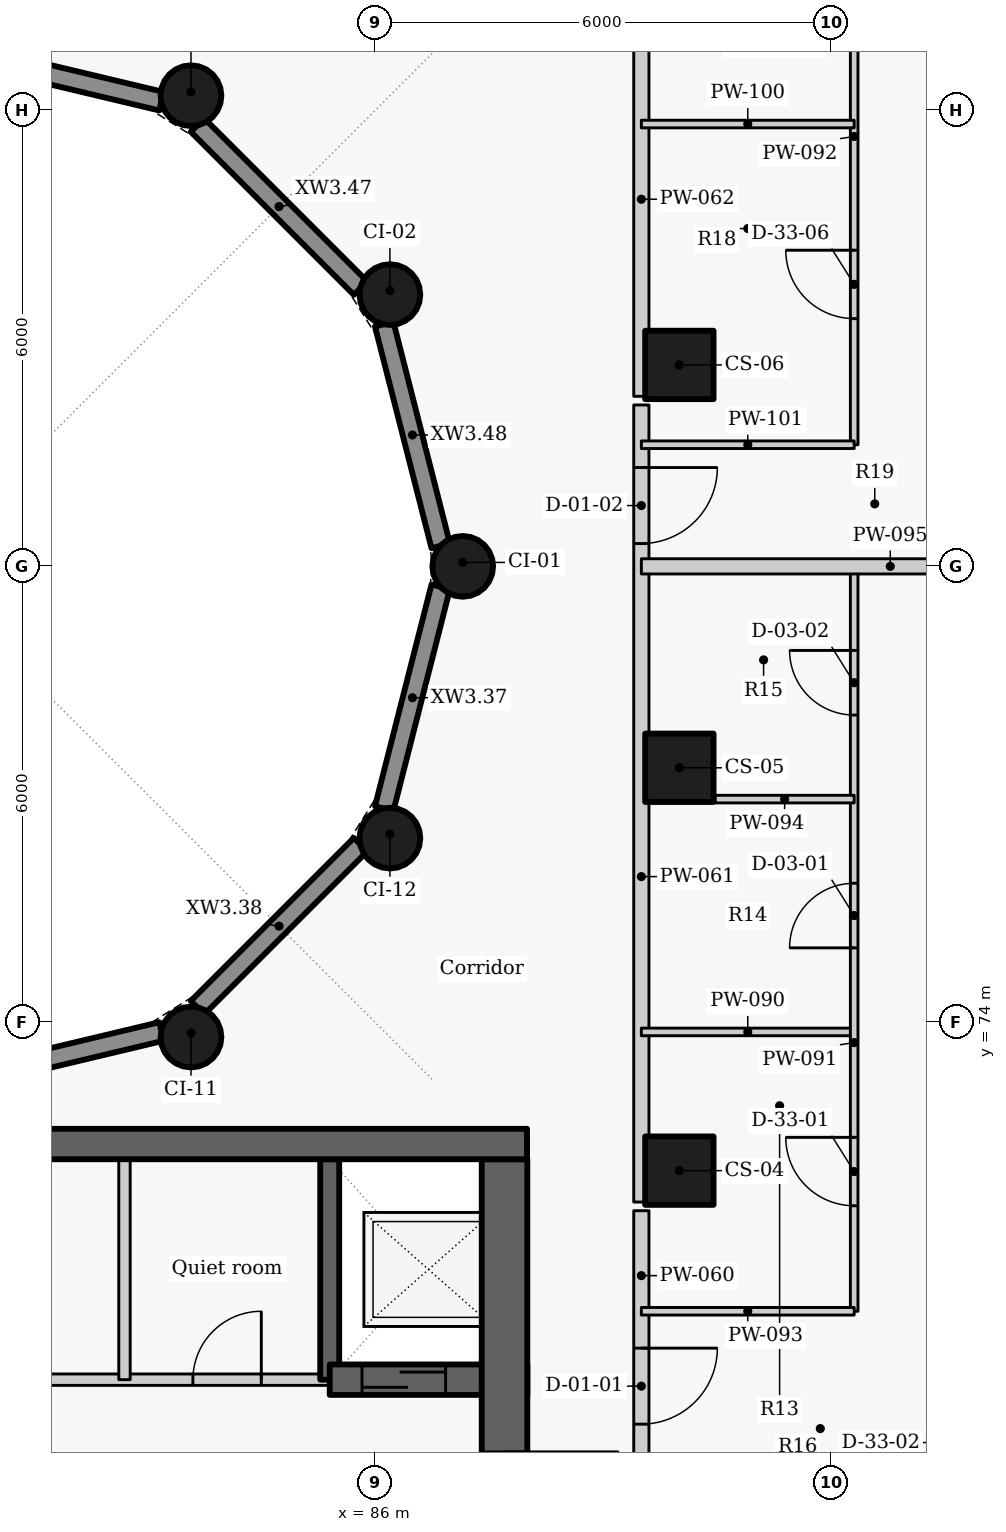
"""IFC4 building model, lengths in metres.
Left out: names, types, materials, properties, quantities, classifications, styles, units other than length and angle.
Written with IfcOpenShell. Run it as: python <this file> out.ifc"""

import sys

from ifc_helpers import new_model, si_unit, direction, frame, frame_2d, origin, origin_2d, place, context, subcontext, project, spatial, rectangle, circle, extrude, element, fill, save


model = new_model("IFC4")
c1 = context("Model", 3, precision=1e-05, world=origin(), true_north=direction((0.0, 1.0)))
c2 = subcontext(c1, "Body", "Model", "MODEL_VIEW")
j1 = project(units=[si_unit("LENGTHUNIT", "METRE"), si_unit("PLANEANGLEUNIT", "RADIAN")], contexts=[c1])
p1 = place(None, origin())
s1 = spatial("IfcSite", under=j1, at=p1, CompositionType="ELEMENT")
p2 = place(p1, origin())
s2 = spatial("IfcBuilding", under=s1, at=p2, CompositionType="ELEMENT")
p3 = place(p2, frame((0.0, 0.0, 229.5)))
s3 = spatial("IfcBuildingStorey", under=s2, at=p3, CompositionType="ELEMENT", Elevation=229.5)
for number, where, z_axis, x_axis in (
    (1, (90.0, 72.05, 0.0), (0.0, 0.0, 1.0), (0.0, 1.0, 0.0)),
    (2, (90.0, 77.35, 0.0), (0.0, 0.0, 1.0), (0.0, 1.0, 0.0)),
    (3, (90.0, 82.65, 0.0), (0.0, 0.0, 1.0), (0.0, 1.0, 0.0)),
):
    element("IfcColumn", number, at=place(p3, frame(where, z_axis=z_axis, x_axis=x_axis)), inside=s3, PredefinedType="COLUMN", context=c2, shape_type="SweptSolid", body=[
        extrude(rectangle(XDim=0.9, YDim=0.9, at=origin_2d()), origin(), (0.0, 0.0, 1.0), 3.3),
    ])
for number, where, z_axis, x_axis in (
    (4, (87.15, 80.0, 0.0), (0.0, 0.0, 1.0), (0.0, 1.0, 0.0)),
    (5, (86.192, 83.575, 0.0), (0.0, 0.0, 1.0), (-0.5, 0.866, 0.0)),
    (6, (83.575, 86.192, 0.0), (0.0, 0.0, 1.0), (-0.866, 0.5, 0.0)),
    (7, (83.575, 73.808, 0.0), (0.0, 0.0, 1.0), (0.866, 0.5, 0.0)),
    (8, (86.192, 76.425, 0.0), (0.0, 0.0, 1.0), (0.5, 0.866, 0.0)),
):
    element("IfcColumn", number, at=place(p3, frame(where, z_axis=z_axis, x_axis=x_axis)), inside=s3, PredefinedType="COLUMN", context=c2, shape_type="SweptSolid", body=[
        extrude(circle(Radius=0.4, at=origin_2d()), origin(), (0.0, 0.0, 1.0), 3.3),
    ])
p4 = place(p3, frame((86.86, 79.73, 0.0), z_axis=(0.0, 0.0, 1.0), x_axis=(-0.247055971283, -0.969001211069, 0.0)))
e9 = element("IfcWall", 9, at=p4, inside=s3, PredefinedType="SOLIDWALL", context=c2, shape_type="SweptSolid", body=[
    extrude(rectangle(XDim=3.01, YDim=0.25, at=frame_2d((1.505, 0.0))), origin(), (0.0, 0.0, 1.0), 2.425),
])
p5 = place(p3, frame((85.806, 76.339, 0.0), z_axis=(0.0, 0.0, 1.0), x_axis=(-0.707106781187, -0.707106781187, 0.0)))
e10 = element("IfcWall", 10, at=p5, inside=s3, PredefinedType="SOLIDWALL", context=c2, shape_type="SweptSolid", body=[
    extrude(rectangle(XDim=3.033, YDim=0.25, at=frame_2d((1.517, 0.0))), origin(), (0.0, 0.0, 1.0), 2.425),
])
for number, where, z_axis, x_axis in (
    (11, (83.186, 73.881, 0.0), (0.0, 0.0, 1.0), (-0.973, -0.232, 0.0)),
    (12, (80.029, 86.872, 0.0), (0.0, 0.0, 1.0), (0.973, -0.232, 0.0)),
):
    element("IfcWall", number, at=place(p3, frame(where, z_axis=z_axis, x_axis=x_axis)), inside=s3, PredefinedType="SOLIDWALL", context=c2, shape_type="SweptSolid", body=[
        extrude(rectangle(XDim=3.246, YDim=0.25, at=frame_2d((1.623, 0.0))), origin(), (0.0, 0.0, 1.0), 2.425),
    ])
p6 = place(p3, frame((83.661, 85.806, 0.0), z_axis=(0.0, 0.0, 1.0), x_axis=(0.707106781187, -0.707106781187, 0.0)))
e13 = element("IfcWall", 13, at=p6, inside=s3, PredefinedType="SOLIDWALL", context=c2, shape_type="SweptSolid", body=[
    extrude(rectangle(XDim=3.033, YDim=0.25, at=frame_2d((1.517, 0.0))), origin(), (0.0, 0.0, 1.0), 2.425),
])
p7 = place(p3, frame((86.117, 83.187, 0.0), z_axis=(0.0, 0.0, 1.0), x_axis=(0.247055971283, -0.969001211069, 0.0)))
e14 = element("IfcWall", 14, at=p7, inside=s3, PredefinedType="SOLIDWALL", context=c2, shape_type="SweptSolid", body=[
    extrude(rectangle(XDim=3.01, YDim=0.25, at=frame_2d((1.505, 0.0))), origin(), (0.0, 0.0, 1.0), 2.425),
])
p8 = place(p3, frame((72.0, 69.3, 0.0), z_axis=(0.0, 0.0, 1.0), x_axis=(1.0, 0.0, 0.0)))
e15 = element("IfcWall", 15, at=p8, inside=s3, PredefinedType="PARTITIONING", context=c2, shape_type="SweptSolid", body=[
    extrude(rectangle(XDim=13.4, YDim=0.15, at=frame_2d((6.7, 0.0))), origin(), (0.0, 0.0, 1.0), 3.025),
])
p9 = place(p8, frame((1.175, 0.0, 0.0)))
e16 = element("IfcOpeningElement", 16, at=p9, cuts=e15, PredefinedType="OPENING", context=c2, shape_type="SweptSolid", body=[
    extrude(rectangle(XDim=0.9, YDim=2.1, at=frame_2d((0.45, 1.05))), frame((0.0, 0.085, 0.0), z_axis=(0.0, -1.0, 0.0), x_axis=(1.0, 0.0, 0.0)), (0.0, 0.0, 1.0), 0.17),
])
p10 = place(p8, frame((6.2, 0.0, 0.0)))
e17 = element("IfcOpeningElement", 17, at=p10, cuts=e15, PredefinedType="OPENING", context=c2, shape_type="SweptSolid", body=[
    extrude(rectangle(XDim=0.9, YDim=2.1, at=frame_2d((0.45, 1.05))), frame((0.0, 0.085, 0.0), z_axis=(0.0, -1.0, 0.0), x_axis=(1.0, 0.0, 0.0)), (0.0, 0.0, 1.0), 0.17),
])
p11 = place(p8, frame((11.6, 0.0, 0.0)))
e18 = element("IfcOpeningElement", 18, at=p11, cuts=e15, PredefinedType="OPENING", context=c2, shape_type="SweptSolid", body=[
    extrude(rectangle(XDim=0.9, YDim=2.1, at=frame_2d((0.45, 1.05))), frame((0.0, 0.085, 0.0), z_axis=(0.0, -1.0, 0.0), x_axis=(1.0, 0.0, 0.0)), (0.0, 0.0, 1.0), 0.17),
])
p12 = place(p3, frame((85.4, 69.3, -0.275), z_axis=(0.0, 0.0, 1.0), x_axis=(0.0, 1.0, 0.0)))
e19 = element("IfcWall", 19, at=p12, inside=s3, PredefinedType="SHEAR", context=c2, shape_type="SweptSolid", body=[
    extrude(rectangle(XDim=2.9, YDim=0.25, at=frame_2d((1.45, 0.0))), origin(), (0.0, 0.0, 1.0), 3.3),
])
p13 = place(p3, frame((85.4, 69.3, -0.275), z_axis=(0.0, 0.0, 1.0), x_axis=(1.0, 0.0, 0.0)))
e20 = element("IfcWall", 20, at=p13, inside=s3, PredefinedType="SHEAR", context=c2, shape_type="SweptSolid", body=[
    extrude(rectangle(XDim=2.6, YDim=0.4, at=frame_2d((1.3, 0.0))), origin(), (0.0, 0.0, 1.0), 3.3),
])
p14 = place(p13, frame((0.425, 0.0, 0.275)))
e21 = element("IfcOpeningElement", 21, at=p14, cuts=e20, PredefinedType="OPENING", context=c2, shape_type="SweptSolid", body=[
    extrude(rectangle(XDim=1.1, YDim=2.1, at=frame_2d((0.55, 1.05))), frame((0.0, 0.21, 0.0), z_axis=(0.0, -1.0, 0.0), x_axis=(1.0, 0.0, 0.0)), (0.0, 0.0, 1.0), 0.42),
])
p15 = place(p3, frame((87.7, 72.2, -0.275), z_axis=(0.0, 0.0, 1.0), x_axis=(0.0, -1.0, 0.0)))
e22 = element("IfcWall", 22, at=p15, inside=s3, PredefinedType="SHEAR", context=c2, shape_type="SweptSolid", body=[
    extrude(rectangle(XDim=14.25, YDim=0.6, at=frame_2d((7.125, 0.0))), origin(), (0.0, 0.0, 1.0), 3.3),
])
p16 = place(p15, frame((3.85, 0.0, 0.275)))
e23 = element("IfcOpeningElement", 23, at=p16, cuts=e22, PredefinedType="OPENING", context=c2, shape_type="SweptSolid", body=[
    extrude(rectangle(XDim=1.5, YDim=2.1, at=frame_2d((0.75, 1.05))), frame((0.0, 0.31, 0.0), z_axis=(0.0, -1.0, 0.0), x_axis=(1.0, 0.0, 0.0)), (0.0, 0.0, 1.0), 0.62),
])
p17 = place(p15, frame((11.125, 0.0, 0.275)))
e24 = element("IfcOpeningElement", 24, at=p17, cuts=e22, PredefinedType="OPENING", context=c2, shape_type="SweptSolid", body=[
    extrude(rectangle(XDim=1.1, YDim=2.1, at=frame_2d((0.55, 1.05))), frame((0.0, 0.31, 0.0), z_axis=(0.0, -1.0, 0.0), x_axis=(1.0, 0.0, 0.0)), (0.0, 0.0, 1.0), 0.62),
])
p18 = place(p3, frame((82.7, 69.3, 0.0), z_axis=(0.0, 0.0, 1.0), x_axis=(0.0, 1.0, 0.0)))
e25 = element("IfcWall", 25, at=p18, inside=s3, PredefinedType="PARTITIONING", context=c2, shape_type="SweptSolid", body=[
    extrude(rectangle(XDim=2.9, YDim=0.15, at=frame_2d((1.45, 0.0))), origin(), (0.0, 0.0, 1.0), 3.025),
])
p19 = place(p3, frame((89.5, 71.523, 0.0), z_axis=(0.0, 0.0, 1.0), x_axis=(0.0, -1.0, 0.0)))
e26 = element("IfcWall", 26, at=p19, inside=s3, PredefinedType="PARTITIONING", context=c2, shape_type="SweptSolid", body=[
    extrude(rectangle(XDim=3.296, YDim=0.2, at=frame_2d((1.648, 0.0))), origin(), (0.0, 0.0, 1.0), 3.025),
])
p20 = place(p19, frame((1.808, 0.0, 0.0)))
e27 = element("IfcOpeningElement", 27, at=p20, cuts=e26, PredefinedType="OPENING", context=c2, shape_type="SweptSolid", body=[
    extrude(rectangle(XDim=1.0, YDim=2.1, at=frame_2d((0.5, 1.05))), frame((0.0, 0.11, 0.0), z_axis=(0.0, -1.0, 0.0), x_axis=(1.0, 0.0, 0.0)), (0.0, 0.0, 1.0), 0.22),
])
p21 = place(p3, frame((89.5, 82.123, 0.0), z_axis=(0.0, 0.0, 1.0), x_axis=(0.0, -1.0, 0.0)))
e28 = element("IfcWall", 28, at=p21, inside=s3, PredefinedType="PARTITIONING", context=c2, shape_type="SweptSolid", body=[
    extrude(rectangle(XDim=10.486, YDim=0.2, at=frame_2d((5.243, 0.0))), origin(), (0.0, 0.0, 1.0), 3.025),
])
p22 = place(p21, frame((0.823, 0.0, 0.0)))
e29 = element("IfcOpeningElement", 29, at=p22, cuts=e28, PredefinedType="OPENING", context=c2, shape_type="SweptSolid", body=[
    extrude(rectangle(XDim=1.0, YDim=2.1, at=frame_2d((0.5, 1.05))), frame((0.0, 0.11, 0.0), z_axis=(0.0, -1.0, 0.0), x_axis=(1.0, 0.0, 0.0)), (0.0, 0.0, 1.0), 0.22),
])
p23 = place(p3, frame((89.5, 82.237, 0.0), z_axis=(0.0, 0.0, 1.0), x_axis=(0.0, 1.0, 0.0)))
e30 = element("IfcWall", 30, at=p23, inside=s3, PredefinedType="PARTITIONING", context=c2, shape_type="SweptSolid", body=[
    extrude(rectangle(XDim=5.186, YDim=0.2, at=frame_2d((2.593, 0.0))), origin(), (0.0, 0.0, 1.0), 3.025),
])
p24 = place(p3, frame((89.5, 73.875, 0.0), z_axis=(0.0, 0.0, 1.0), x_axis=(1.0, 0.0, 0.0)))
e31 = element("IfcWall", 31, at=p24, inside=s3, PredefinedType="PARTITIONING", context=c2, shape_type="SweptSolid", body=[
    extrude(rectangle(XDim=2.8, YDim=0.1, at=frame_2d((1.4, 0.0))), origin(), (0.0, 0.0, 1.0), 2.505),
])
p25 = place(p3, frame((92.3, 70.2, 0.0), z_axis=(0.0, 0.0, 1.0), x_axis=(0.0, 1.0, 0.0)))
e32 = element("IfcWall", 32, at=p25, inside=s3, PredefinedType="PARTITIONING", context=c2, shape_type="SweptSolid", body=[
    extrude(rectangle(XDim=9.8, YDim=0.1, at=frame_2d((4.9, 0.0))), origin(), (0.0, 0.0, 1.0), 3.025),
])
p26 = place(p25, frame((1.388, 0.0, 0.0)))
e33 = element("IfcOpeningElement", 33, at=p26, cuts=e32, PredefinedType="OPENING", context=c2, shape_type="SweptSolid", body=[
    extrude(rectangle(XDim=0.9, YDim=2.1, at=frame_2d((0.45, 1.05))), frame((0.0, 0.06, 0.0), z_axis=(0.0, -1.0, 0.0), x_axis=(1.0, 0.0, 0.0)), (0.0, 0.0, 1.0), 0.12),
])
p27 = place(p25, frame((4.781, 0.0, 0.0)))
e34 = element("IfcOpeningElement", 34, at=p27, cuts=e32, PredefinedType="OPENING", context=c2, shape_type="SweptSolid", body=[
    extrude(rectangle(XDim=0.85, YDim=2.1, at=frame_2d((0.425, 1.05))), frame((0.0, 0.06, 0.0), z_axis=(0.0, -1.0, 0.0), x_axis=(1.0, 0.0, 0.0)), (0.0, 0.0, 1.0), 0.12),
])
p28 = place(p25, frame((7.844, 0.0, 0.0)))
e35 = element("IfcOpeningElement", 35, at=p28, cuts=e32, PredefinedType="OPENING", context=c2, shape_type="SweptSolid", body=[
    extrude(rectangle(XDim=0.85, YDim=2.1, at=frame_2d((0.425, 1.05))), frame((0.0, 0.06, 0.0), z_axis=(0.0, -1.0, 0.0), x_axis=(1.0, 0.0, 0.0)), (0.0, 0.0, 1.0), 0.12),
])
p29 = place(p3, frame((92.3, 81.6, 0.0), z_axis=(0.0, 0.0, 1.0), x_axis=(0.0, 1.0, 0.0)))
e36 = element("IfcWall", 36, at=p29, inside=s3, PredefinedType="PARTITIONING", context=c2, shape_type="SweptSolid", body=[
    extrude(rectangle(XDim=11.25, YDim=0.1, at=frame_2d((5.625, 0.0))), origin(), (0.0, 0.0, 1.0), 3.025),
])
p30 = place(p29, frame((1.659, 0.0, 0.0)))
e37 = element("IfcOpeningElement", 37, at=p30, cuts=e36, PredefinedType="OPENING", context=c2, shape_type="SweptSolid", body=[
    extrude(rectangle(XDim=0.9, YDim=2.1, at=frame_2d((0.45, 1.05))), frame((0.0, 0.06, 0.0), z_axis=(0.0, -1.0, 0.0), x_axis=(1.0, 0.0, 0.0)), (0.0, 0.0, 1.0), 0.12),
])
p31 = place(p29, frame((5.552, 0.0, 0.0)))
e38 = element("IfcOpeningElement", 38, at=p31, cuts=e36, PredefinedType="OPENING", context=c2, shape_type="SweptSolid", body=[
    extrude(rectangle(XDim=0.85, YDim=2.1, at=frame_2d((0.425, 1.05))), frame((0.0, 0.06, 0.0), z_axis=(0.0, -1.0, 0.0), x_axis=(1.0, 0.0, 0.0)), (0.0, 0.0, 1.0), 0.12),
])
p32 = place(p29, frame((9.067, 0.0, 0.0)))
e39 = element("IfcOpeningElement", 39, at=p32, cuts=e36, PredefinedType="OPENING", context=c2, shape_type="SweptSolid", body=[
    extrude(rectangle(XDim=0.85, YDim=2.1, at=frame_2d((0.425, 1.05))), frame((0.0, 0.06, 0.0), z_axis=(0.0, -1.0, 0.0), x_axis=(1.0, 0.0, 0.0)), (0.0, 0.0, 1.0), 0.12),
])
p33 = place(p3, frame((89.5, 70.2, 0.0), z_axis=(0.0, 0.0, 1.0), x_axis=(1.0, 0.0, 0.0)))
e40 = element("IfcWall", 40, at=p33, inside=s3, PredefinedType="PARTITIONING", context=c2, shape_type="SweptSolid", body=[
    extrude(rectangle(XDim=2.8, YDim=0.1, at=frame_2d((1.4, 0.0))), origin(), (0.0, 0.0, 1.0), 2.505),
])
p34 = place(p3, frame((90.47, 76.938, 0.0), z_axis=(0.0, 0.0, 1.0), x_axis=(1.0, 0.0, 0.0)))
e41 = element("IfcWall", 41, at=p34, inside=s3, PredefinedType="PARTITIONING", context=c2, shape_type="SweptSolid", body=[
    extrude(rectangle(XDim=1.83, YDim=0.1, at=frame_2d((0.915, 0.0))), origin(), (0.0, 0.0, 1.0), 3.025),
])
p35 = place(p3, frame((89.5, 80.0, 0.0), z_axis=(0.0, 0.0, 1.0), x_axis=(1.0, 0.0, 0.0)))
e42 = element("IfcWall", 42, at=p35, inside=s3, PredefinedType="PARTITIONING", context=c2, shape_type="SweptSolid", body=[
    extrude(rectangle(XDim=6.55, YDim=0.2, at=frame_2d((3.275, 0.0))), origin(), (0.0, 0.0, 1.0), 2.405),
])
for number, where, z_axis, x_axis in (
    (43, (89.5, 85.819, 0.0), (0.0, 0.0, 1.0), (1.0, 0.0, 0.0)),
    (44, (89.5, 81.6, 0.0), (0.0, 0.0, 1.0), (1.0, 0.0, 0.0)),
):
    element("IfcWall", number, at=place(p3, frame(where, z_axis=z_axis, x_axis=x_axis)), inside=s3, PredefinedType="PARTITIONING", context=c2, shape_type="SweptSolid", body=[
        extrude(rectangle(XDim=2.8, YDim=0.1, at=frame_2d((1.4, 0.0))), origin(), (0.0, 0.0, 1.0), 2.505),
    ])
p36 = place(p3, frame((72.004, 72.4, -0.275), z_axis=(0.0, 0.0, 1.0), x_axis=(1.0, 0.0, 0.0)))
e45 = element("IfcWall", 45, at=p36, inside=s3, PredefinedType="SHEAR", context=c2, shape_type="SweptSolid", body=[
    extrude(rectangle(XDim=15.992, YDim=0.4, at=frame_2d((7.996, 0.0))), origin(), (0.0, 0.0, 1.0), 3.3),
])
p37 = place(p14, origin())
e46 = element("IfcDoor", 46, at=p37, inside=s3, OperationType="SLIDING_TO_LEFT", PredefinedType="DOOR", context=c2, shape_type="SweptSolid", body=[
    extrude(rectangle(XDim=1.1, YDim=2.1, at=frame_2d((0.55, 1.05))), frame((0.0, 0.025, 0.0), z_axis=(0.0, -1.0, 0.0), x_axis=(1.0, 0.0, 0.0)), (0.0, 0.0, 1.0), 0.05),
])
fill(e21, e46)
p38 = place(p11, origin())
e47 = element("IfcDoor", 47, at=p38, inside=s3, OperationType="SINGLE_SWING_RIGHT", PredefinedType="DOOR", context=c2, shape_type="SweptSolid", body=[
    extrude(rectangle(XDim=0.9, YDim=2.1, at=frame_2d((0.45, 1.05))), frame((0.0, 0.025, 0.0), z_axis=(0.0, -1.0, 0.0), x_axis=(1.0, 0.0, 0.0)), (0.0, 0.0, 1.0), 0.05),
])
fill(e18, e47)
p39 = place(p20, origin())
e48 = element("IfcDoor", 48, at=p39, inside=s3, OperationType="SINGLE_SWING_LEFT", PredefinedType="DOOR", context=c2, shape_type="SweptSolid", body=[
    extrude(rectangle(XDim=1.0, YDim=2.1, at=frame_2d((0.5, 1.05))), frame((0.0, 0.025, 0.0), z_axis=(0.0, -1.0, 0.0), x_axis=(1.0, 0.0, 0.0)), (0.0, 0.0, 1.0), 0.05),
])
fill(e27, e48)
p40 = place(p26, origin())
e49 = element("IfcDoor", 49, at=p40, inside=s3, OperationType="SINGLE_SWING_RIGHT", PredefinedType="DOOR", context=c2, shape_type="SweptSolid", body=[
    extrude(rectangle(XDim=0.9, YDim=2.1, at=frame_2d((0.45, 1.05))), frame((0.0, 0.025, 0.0), z_axis=(0.0, -1.0, 0.0), x_axis=(1.0, 0.0, 0.0)), (0.0, 0.0, 1.0), 0.05),
])
fill(e33, e49)
p41 = place(p27, origin())
e50 = element("IfcDoor", 50, at=p41, inside=s3, OperationType="SINGLE_SWING_LEFT", PredefinedType="DOOR", context=c2, shape_type="SweptSolid", body=[
    extrude(rectangle(XDim=0.85, YDim=2.1, at=frame_2d((0.425, 1.05))), frame((0.0, 0.025, 0.0), z_axis=(0.0, -1.0, 0.0), x_axis=(1.0, 0.0, 0.0)), (0.0, 0.0, 1.0), 0.05),
])
fill(e34, e50)
p42 = place(p28, origin())
e51 = element("IfcDoor", 51, at=p42, inside=s3, OperationType="SINGLE_SWING_RIGHT", PredefinedType="DOOR", context=c2, shape_type="SweptSolid", body=[
    extrude(rectangle(XDim=0.85, YDim=2.1, at=frame_2d((0.425, 1.05))), frame((0.0, 0.025, 0.0), z_axis=(0.0, -1.0, 0.0), x_axis=(1.0, 0.0, 0.0)), (0.0, 0.0, 1.0), 0.05),
])
fill(e35, e51)
p43 = place(p22, origin())
e52 = element("IfcDoor", 52, at=p43, inside=s3, OperationType="SINGLE_SWING_LEFT", PredefinedType="DOOR", context=c2, shape_type="SweptSolid", body=[
    extrude(rectangle(XDim=1.0, YDim=2.1, at=frame_2d((0.5, 1.05))), frame((0.0, 0.025, 0.0), z_axis=(0.0, -1.0, 0.0), x_axis=(1.0, 0.0, 0.0)), (0.0, 0.0, 1.0), 0.05),
])
fill(e29, e52)
p44 = place(p30, origin())
e53 = element("IfcDoor", 53, at=p44, inside=s3, OperationType="SINGLE_SWING_RIGHT", PredefinedType="DOOR", context=c2, shape_type="SweptSolid", body=[
    extrude(rectangle(XDim=0.9, YDim=2.1, at=frame_2d((0.45, 1.05))), frame((0.0, 0.025, 0.0), z_axis=(0.0, -1.0, 0.0), x_axis=(1.0, 0.0, 0.0)), (0.0, 0.0, 1.0), 0.05),
])
fill(e37, e53)
save(model, sys.argv[1])
